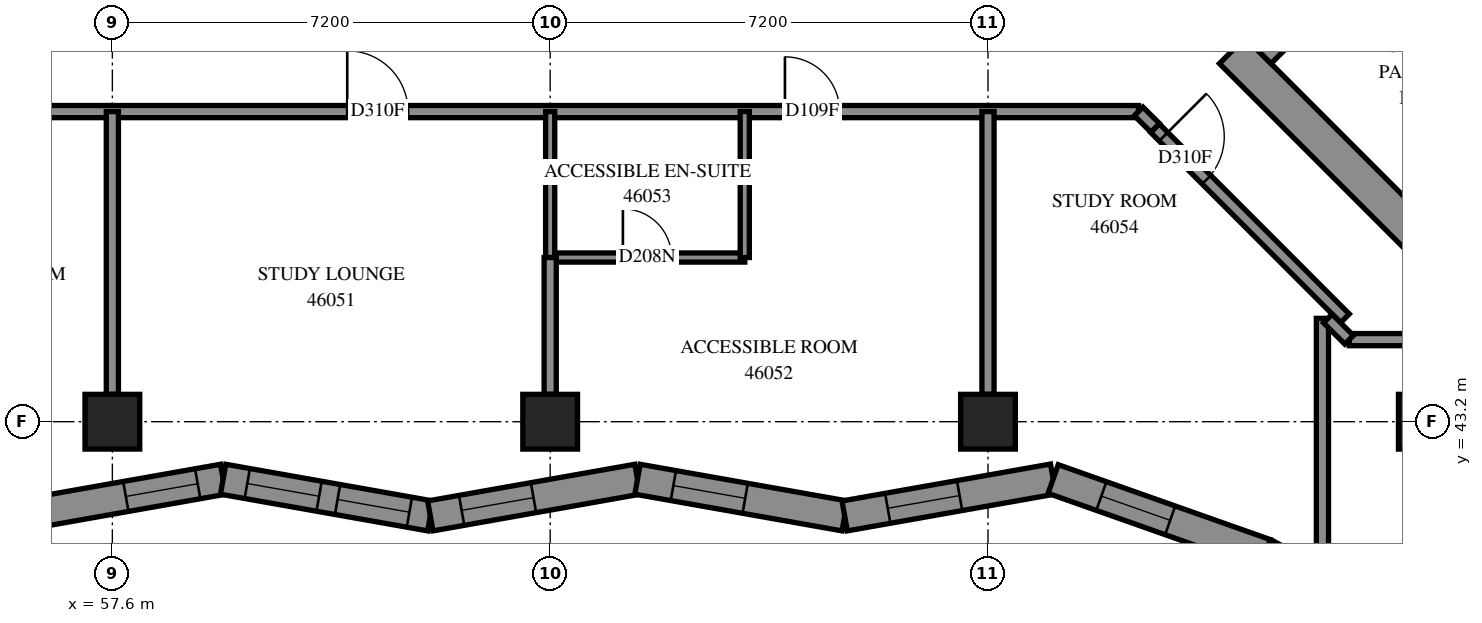
"""IFC4 building model, lengths in metres.
Left out: names, types, materials, properties, quantities, classifications, styles, units other than length and angle.
Written with IfcOpenShell. Run it as: python <this file> out.ifc"""

import sys

from ifc_helpers import new_model, si_unit, direction, frame, frame_2d, origin, origin_2d, place, context, subcontext, project, spatial, polyline, rectangle, outline, extrude, element, fill, save


model = new_model("IFC4")
c1 = context("Model", 3, precision=1e-05, world=origin(), true_north=direction((0.0, 1.0)))
c2 = subcontext(c1, "Body", "Model", "MODEL_VIEW")
j1 = project(units=[si_unit("LENGTHUNIT", "METRE"), si_unit("PLANEANGLEUNIT", "RADIAN")], contexts=[c1])
p1 = place(None, origin())
s1 = spatial("IfcSite", under=j1, at=p1, CompositionType="ELEMENT")
p2 = place(p1, origin())
s2 = spatial("IfcBuilding", under=s1, at=p2, CompositionType="ELEMENT")
p3 = place(p2, frame((0.0, 0.0, 169.4)))
s3 = spatial("IfcBuildingStorey", under=s2, at=p3, CompositionType="ELEMENT", Elevation=169.4)
for number, where, z_axis, x_axis in (
    (1, (57.6, 43.2, 0.0), (0.0, 0.0, 1.0), (1.0, 0.0, 0.0)),
    (2, (64.8, 43.2, 0.0), (0.0, 0.0, 1.0), (1.0, 0.0, 0.0)),
    (3, (72.0, 43.2, 0.0), (0.0, 0.0, 1.0), (1.0, 0.0, 0.0)),
    (4, (79.2, 43.2, 0.0), (0.0, 0.0, 1.0), (1.0, 0.0, 0.0)),
):
    element("IfcColumn", number, at=place(p3, frame(where, z_axis=z_axis, x_axis=x_axis)), inside=s3, PredefinedType="COLUMN", context=c2, shape_type="SweptSolid", body=[
        extrude(rectangle(XDim=0.9, YDim=0.9, at=origin_2d()), origin(), (0.0, 0.0, 1.0), 3.1),
    ])
p4 = place(p3, frame((76.018, 49.302, -0.3), z_axis=(0.0, 0.0, 1.0), x_axis=(0.7071067812, -0.7071067812, 0.0)))
e5 = element("IfcWall", 5, at=p4, inside=s3, PredefinedType="SHEAR", context=c2, shape_type="SweptSolid", body=[
    extrude(rectangle(XDim=15.6, YDim=0.6, at=frame_2d((7.8, 0.0))), origin(), (0.0, 0.0, 1.0), 2.7),
])
p5 = place(p3, frame((76.442, 49.302, -0.3), z_axis=(0.0, 0.0, 1.0), x_axis=(0.7071067812, 0.7071067812, 0.0)))
e6 = element("IfcWall", 6, at=p5, inside=s3, PredefinedType="SHEAR", context=c2, shape_type="SweptSolid", body=[
    extrude(rectangle(XDim=14.4, YDim=0.6, at=frame_2d((7.2, 0.0))), origin(), (0.0, 0.0, 1.0), 2.7),
])
p6 = place(p5, frame((4.55, 0.0, 0.3)))
e7 = element("IfcOpeningElement", 7, at=p6, cuts=e6, PredefinedType="OPENING", context=c2, shape_type="SweptSolid", body=[
    extrude(rectangle(XDim=1.1, YDim=2.1, at=frame_2d((0.55, 1.05))), frame((0.0, 0.31, 0.0), z_axis=(0.0, -1.0, 0.0), x_axis=(1.0, 0.0, 0.0)), (0.0, 0.0, 1.0), 0.62),
])
p7 = place(p5, frame((11.35, 0.0, 0.3)))
e8 = element("IfcOpeningElement", 8, at=p7, cuts=e6, PredefinedType="OPENING", context=c2, shape_type="SweptSolid", body=[
    extrude(rectangle(XDim=1.1, YDim=2.1, at=frame_2d((0.55, 1.05))), frame((0.0, 0.31, 0.0), z_axis=(0.0, -1.0, 0.0), x_axis=(1.0, 0.0, 0.0)), (0.0, 0.0, 1.0), 0.62),
])
p8 = place(p3, frame((56.014, 41.651, 0.0), z_axis=(0.0, 0.0, 1.0), x_axis=(0.9846979018, 0.1742700266, 0.0)))
e9 = element("IfcWall", 9, at=p8, inside=s3, PredefinedType="SOLIDWALL", context=c2, shape_type="SweptSolid", body=[
    extrude(outline(polyline([(-0.044, -0.25), (3.416, -0.25), (3.504, 0.25), (0.044, 0.25), (-0.044, -0.25)])), origin(), (0.0, 0.0, 1.0), 3.1),
])
p9 = place(p8, frame((1.835, 0.0, 0.45)))
e10 = element("IfcOpeningElement", 10, at=p9, cuts=e9, PredefinedType="OPENING", context=c2, shape_type="SweptSolid", body=[
    extrude(rectangle(XDim=1.2, YDim=2.5, at=frame_2d((0.6, 1.25))), frame((0.0, 0.26, 0.0), z_axis=(0.0, -1.0, 0.0), x_axis=(1.0, 0.0, 0.0)), (0.0, 0.0, 1.0), 0.52),
])
p10 = place(p3, frame((59.422, 42.254, 0.0), z_axis=(0.0, 0.0, 1.0), x_axis=(0.9846979018, -0.1742700266, 0.0)))
e11 = element("IfcWall", 11, at=p10, inside=s3, PredefinedType="SOLIDWALL", context=c2, shape_type="SweptSolid", body=[
    extrude(outline(polyline([(0.044, -0.25), (3.504, -0.25), (3.416, 0.25), (-0.044, 0.25), (0.044, -0.25)])), origin(), (0.0, 0.0, 1.0), 3.1),
])
p11 = place(p10, frame((0.403, 0.0, 0.45)))
e12 = element("IfcOpeningElement", 12, at=p11, cuts=e11, PredefinedType="OPENING", context=c2, shape_type="SweptSolid", body=[
    extrude(rectangle(XDim=1.2, YDim=2.5, at=frame_2d((0.6, 1.25))), frame((0.0, 0.26, 0.0), z_axis=(0.0, -1.0, 0.0), x_axis=(1.0, 0.0, 0.0)), (0.0, 0.0, 1.0), 0.52),
])
p12 = place(p10, frame((1.911, 0.0, 0.45)))
e13 = element("IfcOpeningElement", 13, at=p12, cuts=e11, PredefinedType="OPENING", context=c2, shape_type="SweptSolid", body=[
    extrude(rectangle(XDim=1.2, YDim=2.5, at=frame_2d((0.6, 1.25))), frame((0.0, 0.26, 0.0), z_axis=(0.0, -1.0, 0.0), x_axis=(1.0, 0.0, 0.0)), (0.0, 0.0, 1.0), 0.52),
])
p13 = place(p3, frame((62.829, 41.651, 0.0), z_axis=(0.0, 0.0, 1.0), x_axis=(0.9846979018, 0.1742700266, 0.0)))
e14 = element("IfcWall", 14, at=p13, inside=s3, PredefinedType="SOLIDWALL", context=c2, shape_type="SweptSolid", body=[
    extrude(outline(polyline([(-0.044, -0.25), (3.416, -0.25), (3.504, 0.25), (0.044, 0.25), (-0.044, -0.25)])), origin(), (0.0, 0.0, 1.0), 3.1),
])
p14 = place(p13, frame((0.523, 0.0, 0.45)))
e15 = element("IfcOpeningElement", 15, at=p14, cuts=e14, PredefinedType="OPENING", context=c2, shape_type="SweptSolid", body=[
    extrude(rectangle(XDim=1.2, YDim=2.5, at=frame_2d((0.6, 1.25))), frame((0.0, 0.26, 0.0), z_axis=(0.0, -1.0, 0.0), x_axis=(1.0, 0.0, 0.0)), (0.0, 0.0, 1.0), 0.52),
])
p15 = place(p3, frame((66.236, 42.254, 0.0), z_axis=(0.0, 0.0, 1.0), x_axis=(0.9846979018, -0.1742700266, 0.0)))
e16 = element("IfcWall", 16, at=p15, inside=s3, PredefinedType="SOLIDWALL", context=c2, shape_type="SweptSolid", body=[
    extrude(outline(polyline([(0.044, -0.25), (3.504, -0.25), (3.416, 0.25), (-0.044, 0.25), (0.044, -0.25)])), origin(), (0.0, 0.0, 1.0), 3.1),
])
p16 = place(p15, frame((0.599, 0.0, 0.45)))
e17 = element("IfcOpeningElement", 17, at=p16, cuts=e16, PredefinedType="OPENING", context=c2, shape_type="SweptSolid", body=[
    extrude(rectangle(XDim=1.2, YDim=2.5, at=frame_2d((0.6, 1.25))), frame((0.0, 0.26, 0.0), z_axis=(0.0, -1.0, 0.0), x_axis=(1.0, 0.0, 0.0)), (0.0, 0.0, 1.0), 0.52),
])
p17 = place(p3, frame((69.643, 41.651, 0.0), z_axis=(0.0, 0.0, 1.0), x_axis=(0.9847004616, 0.1742555624, 0.0)))
e18 = element("IfcWall", 18, at=p17, inside=s3, PredefinedType="SOLIDWALL", context=c2, shape_type="SweptSolid", body=[
    extrude(outline(polyline([(-0.044, -0.25), (3.416, -0.25), (3.547, 0.25), (0.044, 0.25), (-0.044, -0.25)])), origin(), (0.0, 0.0, 1.0), 3.1),
])
p18 = place(p17, frame((0.719, 0.0, 0.45)))
e19 = element("IfcOpeningElement", 19, at=p18, cuts=e18, PredefinedType="OPENING", context=c2, shape_type="SweptSolid", body=[
    extrude(rectangle(XDim=1.2, YDim=2.5, at=frame_2d((0.6, 1.25))), frame((0.0, 0.26, 0.0), z_axis=(0.0, -1.0, 0.0), x_axis=(1.0, 0.0, 0.0)), (0.0, 0.0, 1.0), 0.52),
])
p19 = place(p3, frame((73.072, 42.258, 0.0), z_axis=(0.0, 0.0, 1.0), x_axis=(0.9429553898, -0.3329191086, 0.0)))
e20 = element("IfcWall", 20, at=p19, inside=s3, PredefinedType="SOLIDWALL", context=c2, shape_type="SweptSolid", body=[
    extrude(outline(polyline([(0.066, -0.25), (3.679, -0.25), (3.718, 0.25), (-0.066, 0.25), (0.066, -0.25)])), origin(), (0.0, 0.0, 1.0), 3.1),
])
p20 = place(p19, frame((0.841, 0.0, 0.45)))
e21 = element("IfcOpeningElement", 21, at=p20, cuts=e20, PredefinedType="OPENING", context=c2, shape_type="SweptSolid", body=[
    extrude(rectangle(XDim=1.2, YDim=2.5, at=frame_2d((0.6, 1.25))), frame((0.0, 0.26, 0.0), z_axis=(0.0, -1.0, 0.0), x_axis=(1.0, 0.0, 0.0)), (0.0, 0.0, 1.0), 0.52),
])
p21 = place(p3, frame((76.559, 41.026, 0.0), z_axis=(0.0, 0.0, 1.0), x_axis=(0.8793114622, -0.4762471547, 0.0)))
e22 = element("IfcWall", 22, at=p21, inside=s3, PredefinedType="SOLIDWALL", context=c2, shape_type="SweptSolid", body=[
    extrude(outline(polyline([(0.02, -0.25), (4.241, -0.25), (4.352, 0.25), (-0.02, 0.25), (0.02, -0.25)])), origin(), (0.0, 0.0, 1.0), 3.1),
])
p22 = place(p21, frame((0.317, 0.0, 0.45)))
e23 = element("IfcOpeningElement", 23, at=p22, cuts=e22, PredefinedType="OPENING", context=c2, shape_type="SweptSolid", body=[
    extrude(rectangle(XDim=1.2, YDim=2.5, at=frame_2d((0.6, 1.25))), frame((0.0, 0.26, 0.0), z_axis=(0.0, -1.0, 0.0), x_axis=(1.0, 0.0, 0.0)), (0.0, 0.0, 1.0), 0.52),
])
p23 = place(p21, frame((2.665, 0.0, 0.45)))
e24 = element("IfcOpeningElement", 24, at=p23, cuts=e22, PredefinedType="OPENING", context=c2, shape_type="SweptSolid", body=[
    extrude(rectangle(XDim=1.2, YDim=2.5, at=frame_2d((0.6, 1.25))), frame((0.0, 0.26, 0.0), z_axis=(0.0, -1.0, 0.0), x_axis=(1.0, 0.0, 0.0)), (0.0, 0.0, 1.0), 0.52),
])
p24 = place(p3, frame((55.5, 48.3, 0.0), z_axis=(0.0, 0.0, 1.0), x_axis=(1.0, 0.0, 0.0)))
e25 = element("IfcWall", 25, at=p24, inside=s3, PredefinedType="PARTITIONING", context=c2, shape_type="SweptSolid", body=[
    extrude(rectangle(XDim=18.974, YDim=0.2, at=frame_2d((9.487, 0.0))), origin(), (0.0, 0.0, 1.0), 3.1),
])
p25 = place(p24, frame((5.963, 0.0, 0.0)))
e26 = element("IfcOpeningElement", 26, at=p25, cuts=e25, PredefinedType="OPENING", context=c2, shape_type="SweptSolid", body=[
    extrude(rectangle(XDim=1.0, YDim=2.1, at=frame_2d((0.5, 1.05))), frame((0.0, 0.11, 0.0), z_axis=(0.0, -1.0, 0.0), x_axis=(1.0, 0.0, 0.0)), (0.0, 0.0, 1.0), 0.22),
])
p26 = place(p24, frame((13.161, 0.0, 0.0)))
e27 = element("IfcOpeningElement", 27, at=p26, cuts=e25, PredefinedType="OPENING", context=c2, shape_type="SweptSolid", body=[
    extrude(rectangle(XDim=0.9, YDim=2.1, at=frame_2d((0.45, 1.05))), frame((0.0, 0.11, 0.0), z_axis=(0.0, -1.0, 0.0), x_axis=(1.0, 0.0, 0.0)), (0.0, 0.0, 1.0), 0.22),
])
for number, where, z_axis, x_axis in (
    (28, (57.6, 43.65, 0.0), (0.0, 0.0, 1.0), (0.0, 1.0, 0.0)),
    (29, (72.0, 43.65, 0.0), (0.0, 0.0, 1.0), (0.0, 1.0, 0.0)),
):
    element("IfcWall", number, at=place(p3, frame(where, z_axis=z_axis, x_axis=x_axis)), inside=s3, PredefinedType="PARTITIONING", context=c2, shape_type="SweptSolid", body=[
        extrude(rectangle(XDim=4.65, YDim=0.2, at=frame_2d((2.325, 0.0))), origin(), (0.0, 0.0, 1.0), 3.1),
    ])
p27 = place(p3, frame((74.745, 48.029, 0.0), z_axis=(0.0, 0.0, 1.0), x_axis=(0.7068806156, -0.7073328745, 0.0)))
e30 = element("IfcWall", 30, at=p27, inside=s3, PredefinedType="PARTITIONING", context=c2, shape_type="SweptSolid", body=[
    extrude(rectangle(XDim=4.422, YDim=0.2, at=frame_2d((2.211, 0.0))), origin(), (0.0, 0.0, 1.0), 3.1),
])
p28 = place(p27, frame((0.199, 0.0, 0.0)))
e31 = element("IfcOpeningElement", 31, at=p28, cuts=e30, PredefinedType="OPENING", context=c2, shape_type="SweptSolid", body=[
    extrude(rectangle(XDim=1.0, YDim=2.1, at=frame_2d((0.5, 1.05))), frame((0.0, 0.11, 0.0), z_axis=(0.0, -1.0, 0.0), x_axis=(1.0, 0.0, 0.0)), (0.0, 0.0, 1.0), 0.22),
])
p29 = place(p3, frame((77.5, 40.801, 0.0), z_axis=(0.0, 0.0, 1.0), x_axis=(0.0, 1.0, 0.0)))
e32 = element("IfcWall", 32, at=p29, inside=s3, PredefinedType="PARTITIONING", context=c2, shape_type="SweptSolid", body=[
    extrude(rectangle(XDim=4.099, YDim=0.2, at=frame_2d((2.05, 0.0))), origin(), (0.0, 0.0, 1.0), 3.1),
])
p30 = place(p3, frame((64.8, 45.9, 0.0), z_axis=(0.0, 0.0, 1.0), x_axis=(1.0, 0.0, 0.0)))
e33 = element("IfcWall", 33, at=p30, inside=s3, PredefinedType="PARTITIONING", context=c2, shape_type="SweptSolid", body=[
    extrude(rectangle(XDim=3.2, YDim=0.15, at=frame_2d((1.6, 0.0))), origin(), (0.0, 0.0, 1.0), 3.1),
])
p31 = place(p30, frame((1.196, 0.0, 0.0)))
e34 = element("IfcOpeningElement", 34, at=p31, cuts=e33, PredefinedType="OPENING", context=c2, shape_type="SweptSolid", body=[
    extrude(rectangle(XDim=0.8, YDim=2.1, at=frame_2d((0.4, 1.05))), frame((0.0, 0.085, 0.0), z_axis=(0.0, -1.0, 0.0), x_axis=(1.0, 0.0, 0.0)), (0.0, 0.0, 1.0), 0.17),
])
for number, where, z_axis, x_axis in (
    (35, (68.0, 45.9, 0.0), (0.0, 0.0, 1.0), (0.0, 1.0, 0.0)),
    (36, (64.8, 45.9, 0.0), (0.0, 0.0, 1.0), (0.0, 1.0, 0.0)),
):
    element("IfcWall", number, at=place(p3, frame(where, z_axis=z_axis, x_axis=x_axis)), inside=s3, PredefinedType="PARTITIONING", context=c2, shape_type="SweptSolid", body=[
        extrude(rectangle(XDim=2.4, YDim=0.15, at=frame_2d((1.2, 0.0))), origin(), (0.0, 0.0, 1.0), 3.1),
    ])
p32 = place(p3, frame((77.942, 44.55, 0.0), z_axis=(0.0, 0.0, 1.0), x_axis=(1.0, 0.0, 0.0)))
e37 = element("IfcWall", 37, at=p32, inside=s3, PredefinedType="PARTITIONING", context=c2, shape_type="SweptSolid", body=[
    extrude(rectangle(XDim=2.29, YDim=0.2, at=frame_2d((1.145, 0.0))), origin(), (0.0, 0.0, 1.0), 3.1),
])
p33 = place(p3, frame((64.8, 43.65, 0.0), z_axis=(0.0, 0.0, 1.0), x_axis=(0.0, 1.0, 0.0)))
e38 = element("IfcWall", 38, at=p33, inside=s3, PredefinedType="PARTITIONING", context=c2, shape_type="SweptSolid", body=[
    extrude(rectangle(XDim=2.25, YDim=0.2, at=frame_2d((1.125, 0.0))), origin(), (0.0, 0.0, 1.0), 3.1),
])
p34 = place(p3, frame((77.588, 44.897, 0.0), z_axis=(0.0, 0.0, 1.0), x_axis=(0.7071067812, -0.7071067812, 0.0)))
e39 = element("IfcWall", 39, at=p34, inside=s3, PredefinedType="PARTITIONING", context=c2, shape_type="SweptSolid", body=[
    extrude(rectangle(XDim=0.495, YDim=0.2, at=frame_2d((0.247, 0.0))), origin(), (0.0, 0.0, 1.0), 3.1),
])
p35 = place(p3, frame((74.477, 48.303, 0.0), z_axis=(0.0, 0.0, 1.0), x_axis=(0.7097111995, -0.7044927348, 0.0)))
e40 = element("IfcWall", 40, at=p35, inside=s3, PredefinedType="PARTITIONING", context=c2, shape_type="SweptSolid", body=[
    extrude(rectangle(XDim=0.383, YDim=0.2, at=frame_2d((0.192, 0.0))), origin(), (0.0, 0.0, 1.0), 3.1),
])
p36 = place(p9, origin())
e41 = element("IfcWindow", 41, at=p36, inside=s3, PartitioningType="SINGLE_PANEL", PredefinedType="WINDOW", context=c2, shape_type="SweptSolid", body=[
    extrude(rectangle(XDim=1.2, YDim=2.5, at=frame_2d((0.6, 1.25))), frame((0.0, 0.18, 0.0), z_axis=(0.0, -1.0, 0.0), x_axis=(1.0, 0.0, 0.0)), (0.0, 0.0, 1.0), 0.06),
])
fill(e10, e41)
p37 = place(p11, origin())
e42 = element("IfcWindow", 42, at=p37, inside=s3, PartitioningType="SINGLE_PANEL", PredefinedType="WINDOW", context=c2, shape_type="SweptSolid", body=[
    extrude(rectangle(XDim=1.2, YDim=2.5, at=frame_2d((0.6, 1.25))), frame((0.0, 0.18, 0.0), z_axis=(0.0, -1.0, 0.0), x_axis=(1.0, 0.0, 0.0)), (0.0, 0.0, 1.0), 0.06),
])
fill(e12, e42)
p38 = place(p12, origin())
e43 = element("IfcWindow", 43, at=p38, inside=s3, PartitioningType="SINGLE_PANEL", PredefinedType="WINDOW", context=c2, shape_type="SweptSolid", body=[
    extrude(rectangle(XDim=1.2, YDim=2.5, at=frame_2d((0.6, 1.25))), frame((0.0, 0.18, 0.0), z_axis=(0.0, -1.0, 0.0), x_axis=(1.0, 0.0, 0.0)), (0.0, 0.0, 1.0), 0.06),
])
fill(e13, e43)
p39 = place(p14, origin())
e44 = element("IfcWindow", 44, at=p39, inside=s3, PartitioningType="SINGLE_PANEL", PredefinedType="WINDOW", context=c2, shape_type="SweptSolid", body=[
    extrude(rectangle(XDim=1.2, YDim=2.5, at=frame_2d((0.6, 1.25))), frame((0.0, 0.18, 0.0), z_axis=(0.0, -1.0, 0.0), x_axis=(1.0, 0.0, 0.0)), (0.0, 0.0, 1.0), 0.06),
])
fill(e15, e44)
p40 = place(p16, origin())
e45 = element("IfcWindow", 45, at=p40, inside=s3, PartitioningType="SINGLE_PANEL", PredefinedType="WINDOW", context=c2, shape_type="SweptSolid", body=[
    extrude(rectangle(XDim=1.2, YDim=2.5, at=frame_2d((0.6, 1.25))), frame((0.0, 0.18, 0.0), z_axis=(0.0, -1.0, 0.0), x_axis=(1.0, 0.0, 0.0)), (0.0, 0.0, 1.0), 0.06),
])
fill(e17, e45)
p41 = place(p18, origin())
e46 = element("IfcWindow", 46, at=p41, inside=s3, PartitioningType="SINGLE_PANEL", PredefinedType="WINDOW", context=c2, shape_type="SweptSolid", body=[
    extrude(rectangle(XDim=1.2, YDim=2.5, at=frame_2d((0.6, 1.25))), frame((0.0, 0.18, 0.0), z_axis=(0.0, -1.0, 0.0), x_axis=(1.0, 0.0, 0.0)), (0.0, 0.0, 1.0), 0.06),
])
fill(e19, e46)
p42 = place(p20, origin())
e47 = element("IfcWindow", 47, at=p42, inside=s3, PartitioningType="SINGLE_PANEL", PredefinedType="WINDOW", context=c2, shape_type="SweptSolid", body=[
    extrude(rectangle(XDim=1.2, YDim=2.5, at=frame_2d((0.6, 1.25))), frame((0.0, 0.18, 0.0), z_axis=(0.0, -1.0, 0.0), x_axis=(1.0, 0.0, 0.0)), (0.0, 0.0, 1.0), 0.06),
])
fill(e21, e47)
p43 = place(p25, origin())
e48 = element("IfcDoor", 48, at=p43, inside=s3, OperationType="SINGLE_SWING_LEFT", PredefinedType="DOOR", context=c2, shape_type="SweptSolid", body=[
    extrude(rectangle(XDim=1.0, YDim=2.1, at=frame_2d((0.5, 1.05))), frame((0.0, 0.025, 0.0), z_axis=(0.0, -1.0, 0.0), x_axis=(1.0, 0.0, 0.0)), (0.0, 0.0, 1.0), 0.05),
])
fill(e26, e48)
p44 = place(p26, origin())
e49 = element("IfcDoor", 49, at=p44, inside=s3, OperationType="SINGLE_SWING_LEFT", PredefinedType="DOOR", context=c2, shape_type="SweptSolid", body=[
    extrude(rectangle(XDim=0.9, YDim=2.1, at=frame_2d((0.45, 1.05))), frame((0.0, 0.025, 0.0), z_axis=(0.0, -1.0, 0.0), x_axis=(1.0, 0.0, 0.0)), (0.0, 0.0, 1.0), 0.05),
])
fill(e27, e49)
p45 = place(p31, origin())
e50 = element("IfcDoor", 50, at=p45, inside=s3, OperationType="SINGLE_SWING_RIGHT", PredefinedType="DOOR", context=c2, shape_type="SweptSolid", body=[
    extrude(rectangle(XDim=0.8, YDim=2.1, at=frame_2d((0.4, 1.05))), frame((0.0, 0.025, 0.0), z_axis=(0.0, -1.0, 0.0), x_axis=(1.0, 0.0, 0.0)), (0.0, 0.0, 1.0), 0.05),
])
fill(e34, e50)
p46 = place(p28, origin())
e51 = element("IfcDoor", 51, at=p46, inside=s3, OperationType="SINGLE_SWING_LEFT", PredefinedType="DOOR", context=c2, shape_type="SweptSolid", body=[
    extrude(rectangle(XDim=1.0, YDim=2.1, at=frame_2d((0.5, 1.05))), frame((0.0, 0.025, 0.0), z_axis=(0.0, -1.0, 0.0), x_axis=(1.0, 0.0, 0.0)), (0.0, 0.0, 1.0), 0.05),
])
fill(e31, e51)
save(model, sys.argv[1])
